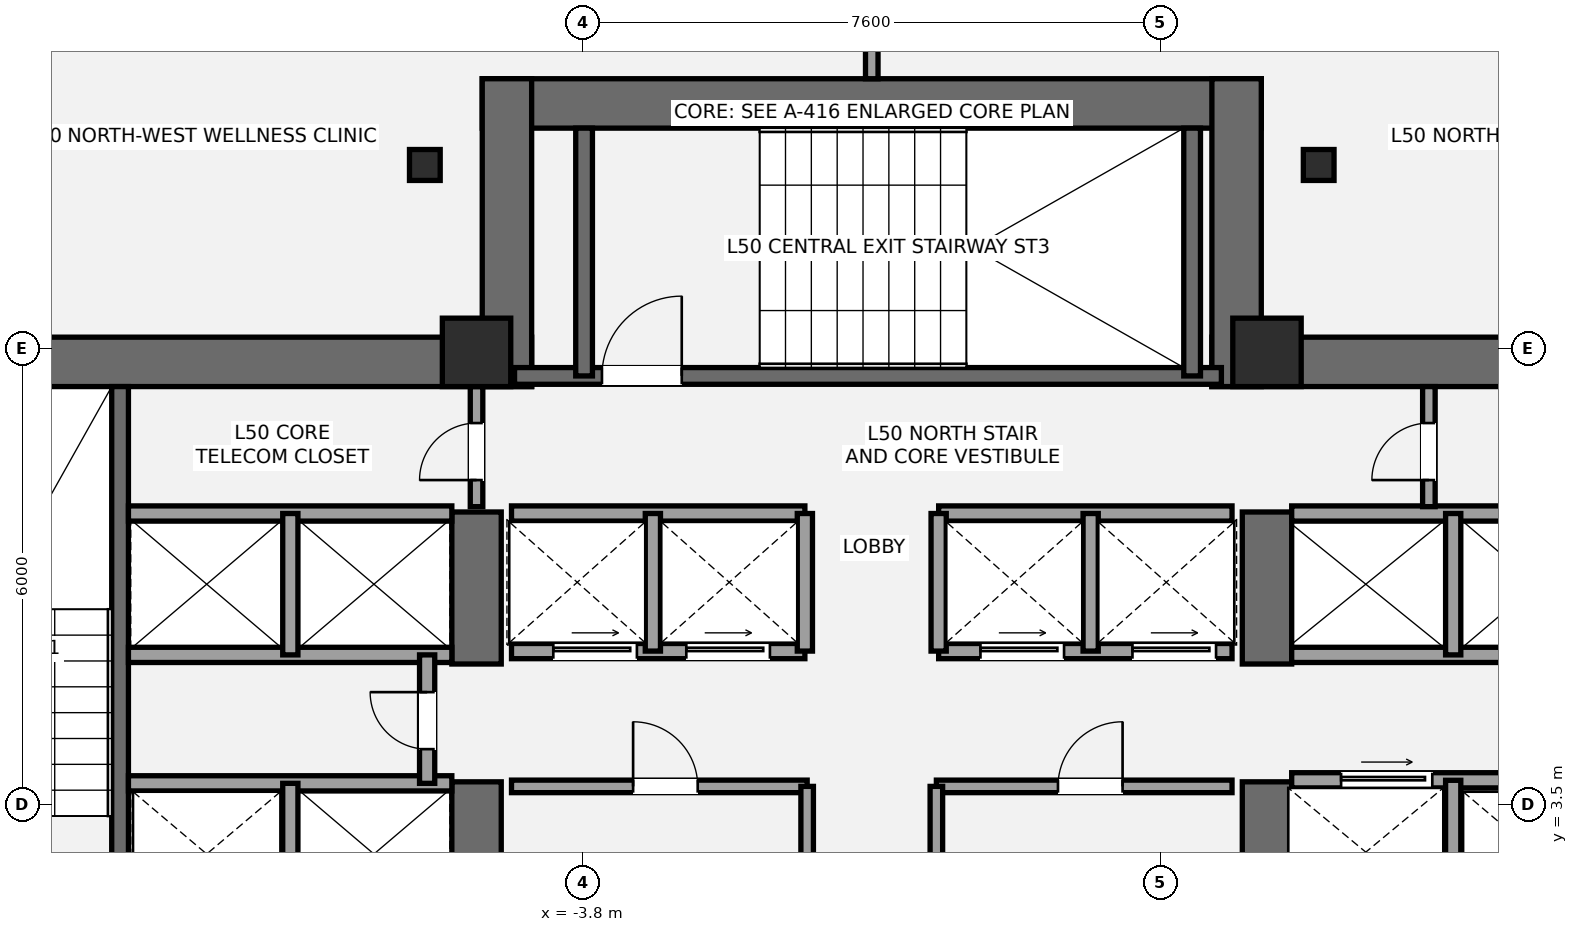
"""IFC4 building model, lengths in metres.
Left out: names, types, materials, properties, quantities, classifications, styles, units other than length and angle.
Written with IfcOpenShell. Run it as: python <this file> out.ifc"""

import sys

from ifc_helpers import new_model, si_unit, direction, frame, frame_2d, origin, origin_2d, place, context, subcontext, project, spatial, rectangle, i_section, extrude, element, fill, save


model = new_model("IFC4")
c1 = context("Model", 3, precision=1e-05, world=origin(), true_north=direction((0.0, 1.0)))
c2 = subcontext(c1, "Body", "Model", "MODEL_VIEW")
j1 = project(units=[si_unit("LENGTHUNIT", "METRE"), si_unit("PLANEANGLEUNIT", "RADIAN")], contexts=[c1])
p1 = place(None, origin())
s1 = spatial("IfcSite", under=j1, at=p1, CompositionType="ELEMENT")
p2 = place(p1, origin())
s2 = spatial("IfcBuilding", under=s1, at=p2, CompositionType="ELEMENT")
p3 = place(p2, frame((0.0, 0.0, 182.2)))
s3 = spatial("IfcBuildingStorey", under=s2, at=p3, CompositionType="ELEMENT", Elevation=182.2)
p4 = place(p3, frame((-13.8, 9.325, 0.0), z_axis=(0.0, 0.0, 1.0), x_axis=(1.0, 0.0, 0.0)))
e1 = element("IfcWall", 1, at=p4, inside=s3, PredefinedType="SHEAR", context=c2, shape_type="SweptSolid", body=[
    extrude(rectangle(XDim=9.325, YDim=0.65, at=frame_2d((4.663, 0.0))), origin(), (0.0, 0.0, 1.0), 3.2),
])
p5 = place(p3, frame((-5.2, 1.2, 0.0), z_axis=(0.0, 0.0, 1.0), x_axis=(0.0, 1.0, 0.0)))
e2 = element("IfcWall", 2, at=p5, inside=s3, PredefinedType="SHEAR", context=c2, shape_type="SweptSolid", body=[
    extrude(rectangle(XDim=2.6, YDim=0.65, at=frame_2d((1.3, 0.0))), origin(), (0.0, 0.0, 1.0), 3.2),
])
p6 = place(p3, frame((-5.2, 5.35, 0.0), z_axis=(0.0, 0.0, 1.0), x_axis=(0.0, 1.0, 0.0)))
e3 = element("IfcWall", 3, at=p6, inside=s3, PredefinedType="SHEAR", context=c2, shape_type="SweptSolid", body=[
    extrude(rectangle(XDim=2.0, YDim=0.65, at=frame_2d((1.0, 0.0))), origin(), (0.0, 0.0, 1.0), 3.2),
])
p7 = place(p3, frame((-9.89, 1.85, 0.0), z_axis=(0.0, 0.0, 1.0), x_axis=(0.0, 1.0, 0.0)))
e4 = element("IfcWall", 4, at=p7, inside=s3, PredefinedType="SHEAR", context=c2, shape_type="SweptSolid", body=[
    extrude(rectangle(XDim=7.15, YDim=0.22, at=frame_2d((3.575, 0.0))), origin(), (0.0, 0.0, 1.0), 3.2),
])
p8 = place(p3, frame((4.475, 9.325, 0.0), z_axis=(0.0, 0.0, 1.0), x_axis=(1.0, 0.0, 0.0)))
e5 = element("IfcWall", 5, at=p8, inside=s3, PredefinedType="SHEAR", context=c2, shape_type="SweptSolid", body=[
    extrude(rectangle(XDim=9.325, YDim=0.65, at=frame_2d((4.663, 0.0))), origin(), (0.0, 0.0, 1.0), 3.2),
])
p9 = place(p3, frame((5.2, 1.2, 0.0), z_axis=(0.0, 0.0, 1.0), x_axis=(0.0, 1.0, 0.0)))
e6 = element("IfcWall", 6, at=p9, inside=s3, PredefinedType="SHEAR", context=c2, shape_type="SweptSolid", body=[
    extrude(rectangle(XDim=2.6, YDim=0.65, at=frame_2d((1.3, 0.0))), origin(), (0.0, 0.0, 1.0), 3.2),
])
p10 = place(p3, frame((5.2, 5.35, 0.0), z_axis=(0.0, 0.0, 1.0), x_axis=(0.0, 1.0, 0.0)))
e7 = element("IfcWall", 7, at=p10, inside=s3, PredefinedType="SHEAR", context=c2, shape_type="SweptSolid", body=[
    extrude(rectangle(XDim=2.0, YDim=0.65, at=frame_2d((1.0, 0.0))), origin(), (0.0, 0.0, 1.0), 3.2),
])
p11 = place(p3, frame((-5.125, 12.725, 0.0), z_axis=(0.0, 0.0, 1.0), x_axis=(1.0, 0.0, 0.0)))
e8 = element("IfcWall", 8, at=p11, inside=s3, PredefinedType="SHEAR", context=c2, shape_type="SweptSolid", body=[
    extrude(rectangle(XDim=10.25, YDim=0.65, at=frame_2d((5.125, 0.0))), origin(), (0.0, 0.0, 1.0), 3.2),
])
for number, where, z_axis, x_axis in (
    (9, (-4.8, 9.0, 0.0), (0.0, 0.0, 1.0), (0.0, 1.0, 0.0)),
    (10, (4.8, 9.0, 0.0), (0.0, 0.0, 1.0), (0.0, 1.0, 0.0)),
):
    element("IfcWall", number, at=place(p3, frame(where, z_axis=z_axis, x_axis=x_axis)), inside=s3, PredefinedType="SHEAR", context=c2, shape_type="SweptSolid", body=[
        extrude(rectangle(XDim=4.05, YDim=0.65, at=frame_2d((2.025, 0.0))), origin(), (0.0, 0.0, 1.0), 3.2),
    ])
p12 = place(p3, frame((-4.7, 9.14, 0.0), z_axis=(0.0, 0.0, 1.0), x_axis=(1.0, 0.0, 0.0)))
e11 = element("IfcWall", 11, at=p12, inside=s3, PredefinedType="SHEAR", context=c2, shape_type="SweptSolid", body=[
    extrude(rectangle(XDim=9.3, YDim=0.22, at=frame_2d((4.65, 0.0))), origin(), (0.0, 0.0, 1.0), 3.2),
])
p13 = place(p12, frame((1.15, 0.0, 0.0)))
e12 = element("IfcOpeningElement", 12, at=p13, cuts=e11, PredefinedType="OPENING", context=c2, shape_type="SweptSolid", body=[
    extrude(rectangle(XDim=1.05, YDim=2.15, at=frame_2d((0.525, 1.075))), frame((0.0, 0.12, 0.0), z_axis=(0.0, -1.0, 0.0), x_axis=(1.0, 0.0, 0.0)), (0.0, 0.0, 1.0), 0.24),
])
for number, where, z_axis, x_axis in (
    (13, (-3.785, 9.14, 0.0), (0.0, 0.0, 1.0), (0.0, 1.0, 0.0)),
    (14, (4.215, 9.14, 0.0), (0.0, 0.0, 1.0), (0.0, 1.0, 0.0)),
):
    element("IfcWall", number, at=place(p3, frame(where, z_axis=z_axis, x_axis=x_axis)), inside=s3, PredefinedType="SHEAR", context=c2, shape_type="SweptSolid", body=[
        extrude(rectangle(XDim=3.26, YDim=0.22, at=frame_2d((1.63, 0.0))), origin(), (0.0, 0.0, 1.0), 3.2),
    ])
for number, where, z_axis, x_axis in (
    (15, (-5.2, 9.45, 0.0), (0.0, 0.0, 1.0), (1.0, 0.0, 0.0)),
    (16, (5.2, 9.45, 0.0), (0.0, 0.0, 1.0), (1.0, 0.0, 0.0)),
):
    element("IfcColumn", number, at=place(p3, frame(where, z_axis=z_axis, x_axis=x_axis)), inside=s3, PredefinedType="COLUMN", context=c2, shape_type="SweptSolid", body=[
        extrude(rectangle(XDim=0.9, YDim=0.9, at=origin_2d()), origin(), (0.0, 0.0, 1.0), 3.2),
    ])
for number, where, z_axis, x_axis in (
    (17, (5.88, 11.915, 0.0), (0.0, 0.0, 1.0), (1.0, 0.0, 0.0)),
    (18, (-5.88, 11.915, 0.0), (0.0, 0.0, 1.0), (1.0, 0.0, 0.0)),
):
    element("IfcColumn", number, at=place(p3, frame(where, z_axis=z_axis, x_axis=x_axis)), inside=s3, PredefinedType="COLUMN", context=c2, shape_type="SweptSolid", body=[
        extrude(i_section(OverallWidth=0.404, OverallDepth=0.407, WebThickness=0.027, FlangeThickness=0.044, at=origin_2d()), origin(), (0.0, 0.0, 1.0), 3.2),
    ])
p14 = place(p3, frame((-9.78, 3.78, 0.0), z_axis=(0.0, 0.0, 1.0), x_axis=(1.0, 0.0, 0.0)))
e19 = element("IfcWall", 19, at=p14, inside=s3, PredefinedType="SOLIDWALL", context=c2, shape_type="SweptSolid", body=[
    extrude(rectangle(XDim=4.255, YDim=0.2, at=frame_2d((2.127, 0.0))), origin(), (0.0, 0.0, 1.0), 3.02),
])
p15 = place(p3, frame((-7.65, 1.85, 0.0), z_axis=(0.0, 0.0, 1.0), x_axis=(0.0, 1.0, 0.0)))
e20 = element("IfcWall", 20, at=p15, inside=s3, PredefinedType="SOLIDWALL", context=c2, shape_type="SweptSolid", body=[
    extrude(rectangle(XDim=1.93, YDim=0.2, at=frame_2d((0.965, 0.0))), origin(), (0.0, 0.0, 1.0), 3.02),
])
for number, where, z_axis, x_axis in (
    (21, (-9.78, 5.47, 0.0), (0.0, 0.0, 1.0), (1.0, 0.0, 0.0)),
    (22, (-9.78, 7.33, 0.0), (0.0, 0.0, 1.0), (1.0, 0.0, 0.0)),
):
    element("IfcWall", number, at=place(p3, frame(where, z_axis=z_axis, x_axis=x_axis)), inside=s3, PredefinedType="SOLIDWALL", context=c2, shape_type="SweptSolid", body=[
        extrude(rectangle(XDim=4.255, YDim=0.2, at=frame_2d((2.127, 0.0))), origin(), (0.0, 0.0, 1.0), 3.02),
    ])
p16 = place(p3, frame((-7.65, 5.47, 0.0), z_axis=(0.0, 0.0, 1.0), x_axis=(0.0, 1.0, 0.0)))
e23 = element("IfcWall", 23, at=p16, inside=s3, PredefinedType="SOLIDWALL", context=c2, shape_type="SweptSolid", body=[
    extrude(rectangle(XDim=1.86, YDim=0.2, at=frame_2d((0.93, 0.0))), origin(), (0.0, 0.0, 1.0), 3.02),
])
p17 = place(p3, frame((-5.85, 3.78, 0.0), z_axis=(0.0, 0.0, 1.0), x_axis=(0.0, 1.0, 0.0)))
e24 = element("IfcWall", 24, at=p17, inside=s3, PredefinedType="SOLIDWALL", context=c2, shape_type="SweptSolid", body=[
    extrude(rectangle(XDim=1.69, YDim=0.2, at=frame_2d((0.845, 0.0))), origin(), (0.0, 0.0, 1.0), 3.02),
])
p18 = place(p17, frame((0.45, 0.0, 0.0)))
e25 = element("IfcOpeningElement", 25, at=p18, cuts=e24, PredefinedType="OPENING", context=c2, shape_type="SweptSolid", body=[
    extrude(rectangle(XDim=0.75, YDim=2.1, at=frame_2d((0.375, 1.05))), frame((0.0, 0.11, 0.0), z_axis=(0.0, -1.0, 0.0), x_axis=(1.0, 0.0, 0.0)), (0.0, 0.0, 1.0), 0.22),
])
p19 = place(p3, frame((5.525, 3.82, 0.0), z_axis=(0.0, 0.0, 1.0), x_axis=(1.0, 0.0, 0.0)))
e26 = element("IfcWall", 26, at=p19, inside=s3, PredefinedType="SOLIDWALL", context=c2, shape_type="SweptSolid", body=[
    extrude(rectangle(XDim=4.255, YDim=0.2, at=frame_2d((2.127, 0.0))), origin(), (0.0, 0.0, 1.0), 3.02),
])
p20 = place(p19, frame((0.65, 0.0, 0.0)))
e27 = element("IfcOpeningElement", 27, at=p20, cuts=e26, PredefinedType="OPENING", context=c2, shape_type="SweptSolid", body=[
    extrude(rectangle(XDim=1.2, YDim=2.2, at=frame_2d((0.6, 1.1))), frame((0.0, 0.11, 0.0), z_axis=(0.0, -1.0, 0.0), x_axis=(1.0, 0.0, 0.0)), (0.0, 0.0, 1.0), 0.22),
])
p21 = place(p3, frame((7.65, 1.85, 0.0), z_axis=(0.0, 0.0, 1.0), x_axis=(0.0, 1.0, 0.0)))
e28 = element("IfcWall", 28, at=p21, inside=s3, PredefinedType="SOLIDWALL", context=c2, shape_type="SweptSolid", body=[
    extrude(rectangle(XDim=1.97, YDim=0.2, at=frame_2d((0.985, 0.0))), origin(), (0.0, 0.0, 1.0), 3.02),
])
for number, where, z_axis, x_axis in (
    (29, (5.525, 5.47, 0.0), (0.0, 0.0, 1.0), (1.0, 0.0, 0.0)),
    (30, (5.525, 7.33, 0.0), (0.0, 0.0, 1.0), (1.0, 0.0, 0.0)),
):
    element("IfcWall", number, at=place(p3, frame(where, z_axis=z_axis, x_axis=x_axis)), inside=s3, PredefinedType="SOLIDWALL", context=c2, shape_type="SweptSolid", body=[
        extrude(rectangle(XDim=4.255, YDim=0.2, at=frame_2d((2.127, 0.0))), origin(), (0.0, 0.0, 1.0), 3.02),
    ])
p22 = place(p3, frame((7.65, 5.47, 0.0), z_axis=(0.0, 0.0, 1.0), x_axis=(0.0, 1.0, 0.0)))
e31 = element("IfcWall", 31, at=p22, inside=s3, PredefinedType="SOLIDWALL", context=c2, shape_type="SweptSolid", body=[
    extrude(rectangle(XDim=1.86, YDim=0.2, at=frame_2d((0.93, 0.0))), origin(), (0.0, 0.0, 1.0), 3.02),
])
p23 = place(p3, frame((-4.74, 3.74, 0.0), z_axis=(0.0, 0.0, 1.0), x_axis=(1.0, 0.0, 0.0)))
e32 = element("IfcWall", 32, at=p23, inside=s3, PredefinedType="PARTITIONING", context=c2, shape_type="SweptSolid", body=[
    extrude(rectangle(XDim=3.89, YDim=0.165, at=frame_2d((1.945, 0.0))), origin(), (0.0, 0.0, 1.0), 3.02),
])
p24 = place(p23, frame((1.6, 0.0, 0.0)))
e33 = element("IfcOpeningElement", 33, at=p24, cuts=e32, PredefinedType="OPENING", context=c2, shape_type="SweptSolid", body=[
    extrude(rectangle(XDim=0.85, YDim=2.1, at=frame_2d((0.425, 1.05))), frame((0.0, 0.093, 0.0), z_axis=(0.0, -1.0, 0.0), x_axis=(1.0, 0.0, 0.0)), (0.0, 0.0, 1.0), 0.185),
])
p25 = place(p3, frame((-0.85, 1.92, 0.0), z_axis=(0.0, 0.0, 1.0), x_axis=(0.0, 1.0, 0.0)))
e34 = element("IfcWall", 34, at=p25, inside=s3, PredefinedType="PARTITIONING", context=c2, shape_type="SweptSolid", body=[
    extrude(rectangle(XDim=1.82, YDim=0.165, at=frame_2d((0.91, 0.0))), origin(), (0.0, 0.0, 1.0), 3.02),
])
p26 = place(p3, frame((0.85, 3.74, 0.0), z_axis=(0.0, 0.0, 1.0), x_axis=(1.0, 0.0, 0.0)))
e35 = element("IfcWall", 35, at=p26, inside=s3, PredefinedType="PARTITIONING", context=c2, shape_type="SweptSolid", body=[
    extrude(rectangle(XDim=3.89, YDim=0.165, at=frame_2d((1.945, 0.0))), origin(), (0.0, 0.0, 1.0), 3.02),
])
p27 = place(p26, frame((1.6, 0.0, 0.0)))
e36 = element("IfcOpeningElement", 36, at=p27, cuts=e35, PredefinedType="OPENING", context=c2, shape_type="SweptSolid", body=[
    extrude(rectangle(XDim=0.85, YDim=2.1, at=frame_2d((0.425, 1.05))), frame((0.0, 0.093, 0.0), z_axis=(0.0, -1.0, 0.0), x_axis=(1.0, 0.0, 0.0)), (0.0, 0.0, 1.0), 0.185),
])
p28 = place(p3, frame((0.85, 1.92, 0.0), z_axis=(0.0, 0.0, 1.0), x_axis=(0.0, 1.0, 0.0)))
e37 = element("IfcWall", 37, at=p28, inside=s3, PredefinedType="PARTITIONING", context=c2, shape_type="SweptSolid", body=[
    extrude(rectangle(XDim=1.82, YDim=0.165, at=frame_2d((0.91, 0.0))), origin(), (0.0, 0.0, 1.0), 3.02),
])
p29 = place(p3, frame((-4.74, 5.52, 0.0), z_axis=(0.0, 0.0, 1.0), x_axis=(1.0, 0.0, 0.0)))
e38 = element("IfcWall", 38, at=p29, inside=s3, PredefinedType="SOLIDWALL", context=c2, shape_type="SweptSolid", body=[
    extrude(rectangle(XDim=3.86, YDim=0.2, at=frame_2d((1.93, 0.0))), origin(), (0.0, 0.0, 1.0), 3.02),
])
p30 = place(p29, frame((0.55, 0.0, 0.0)))
e39 = element("IfcOpeningElement", 39, at=p30, cuts=e38, PredefinedType="OPENING", context=c2, shape_type="SweptSolid", body=[
    extrude(rectangle(XDim=1.1, YDim=2.2, at=frame_2d((0.55, 1.1))), frame((0.0, 0.11, 0.0), z_axis=(0.0, -1.0, 0.0), x_axis=(1.0, 0.0, 0.0)), (0.0, 0.0, 1.0), 0.22),
])
p31 = place(p29, frame((2.3, 0.0, 0.0)))
e40 = element("IfcOpeningElement", 40, at=p31, cuts=e38, PredefinedType="OPENING", context=c2, shape_type="SweptSolid", body=[
    extrude(rectangle(XDim=1.1, YDim=2.2, at=frame_2d((0.55, 1.1))), frame((0.0, 0.11, 0.0), z_axis=(0.0, -1.0, 0.0), x_axis=(1.0, 0.0, 0.0)), (0.0, 0.0, 1.0), 0.22),
])
p32 = place(p3, frame((0.88, 5.52, 0.0), z_axis=(0.0, 0.0, 1.0), x_axis=(1.0, 0.0, 0.0)))
e41 = element("IfcWall", 41, at=p32, inside=s3, PredefinedType="SOLIDWALL", context=c2, shape_type="SweptSolid", body=[
    extrude(rectangle(XDim=3.86, YDim=0.2, at=frame_2d((1.93, 0.0))), origin(), (0.0, 0.0, 1.0), 3.02),
])
p33 = place(p32, frame((0.55, 0.0, 0.0)))
e42 = element("IfcOpeningElement", 42, at=p33, cuts=e41, PredefinedType="OPENING", context=c2, shape_type="SweptSolid", body=[
    extrude(rectangle(XDim=1.1, YDim=2.2, at=frame_2d((0.55, 1.1))), frame((0.0, 0.11, 0.0), z_axis=(0.0, -1.0, 0.0), x_axis=(1.0, 0.0, 0.0)), (0.0, 0.0, 1.0), 0.22),
])
p34 = place(p32, frame((2.55, 0.0, 0.0)))
e43 = element("IfcOpeningElement", 43, at=p34, cuts=e41, PredefinedType="OPENING", context=c2, shape_type="SweptSolid", body=[
    extrude(rectangle(XDim=1.1, YDim=2.2, at=frame_2d((0.55, 1.1))), frame((0.0, 0.11, 0.0), z_axis=(0.0, -1.0, 0.0), x_axis=(1.0, 0.0, 0.0)), (0.0, 0.0, 1.0), 0.22),
])
for number, where, z_axis, x_axis in (
    (44, (-4.74, 7.33, 0.0), (0.0, 0.0, 1.0), (1.0, 0.0, 0.0)),
    (45, (0.88, 7.33, 0.0), (0.0, 0.0, 1.0), (1.0, 0.0, 0.0)),
):
    element("IfcWall", number, at=place(p3, frame(where, z_axis=z_axis, x_axis=x_axis)), inside=s3, PredefinedType="SOLIDWALL", context=c2, shape_type="SweptSolid", body=[
        extrude(rectangle(XDim=3.86, YDim=0.2, at=frame_2d((1.93, 0.0))), origin(), (0.0, 0.0, 1.0), 3.02),
    ])
for number, where, z_axis, x_axis in (
    (46, (-2.88, 5.52, 0.0), (0.0, 0.0, 1.0), (0.0, 1.0, 0.0)),
    (47, (2.88, 5.52, 0.0), (0.0, 0.0, 1.0), (0.0, 1.0, 0.0)),
    (48, (-0.88, 5.52, 0.0), (0.0, 0.0, 1.0), (0.0, 1.0, 0.0)),
    (49, (0.88, 5.52, 0.0), (0.0, 0.0, 1.0), (0.0, 1.0, 0.0)),
):
    element("IfcWall", number, at=place(p3, frame(where, z_axis=z_axis, x_axis=x_axis)), inside=s3, PredefinedType="SOLIDWALL", context=c2, shape_type="SweptSolid", body=[
        extrude(rectangle(XDim=1.81, YDim=0.2, at=frame_2d((0.905, 0.0))), origin(), (0.0, 0.0, 1.0), 3.02),
    ])
p35 = place(p3, frame((-5.2, 7.42, 0.0), z_axis=(0.0, 0.0, 1.0), x_axis=(0.0, 1.0, 0.0)))
e50 = element("IfcWall", 50, at=p35, inside=s3, PredefinedType="PARTITIONING", context=c2, shape_type="SweptSolid", body=[
    extrude(rectangle(XDim=1.58, YDim=0.165, at=frame_2d((0.79, 0.0))), origin(), (0.0, 0.0, 1.0), 3.02),
])
p36 = place(p35, frame((0.35, 0.0, 0.0)))
e51 = element("IfcOpeningElement", 51, at=p36, cuts=e50, PredefinedType="OPENING", context=c2, shape_type="SweptSolid", body=[
    extrude(rectangle(XDim=0.75, YDim=2.1, at=frame_2d((0.375, 1.05))), frame((0.0, 0.093, 0.0), z_axis=(0.0, -1.0, 0.0), x_axis=(1.0, 0.0, 0.0)), (0.0, 0.0, 1.0), 0.185),
])
p37 = place(p3, frame((7.33, 7.42, 0.0), z_axis=(0.0, 0.0, 1.0), x_axis=(0.0, 1.0, 0.0)))
e52 = element("IfcWall", 52, at=p37, inside=s3, PredefinedType="PARTITIONING", context=c2, shape_type="SweptSolid", body=[
    extrude(rectangle(XDim=1.58, YDim=0.165, at=frame_2d((0.79, 0.0))), origin(), (0.0, 0.0, 1.0), 3.02),
])
p38 = place(p37, frame((0.35, 0.0, 0.0)))
e53 = element("IfcOpeningElement", 53, at=p38, cuts=e52, PredefinedType="OPENING", context=c2, shape_type="SweptSolid", body=[
    extrude(rectangle(XDim=0.75, YDim=2.1, at=frame_2d((0.375, 1.05))), frame((0.0, 0.093, 0.0), z_axis=(0.0, -1.0, 0.0), x_axis=(1.0, 0.0, 0.0)), (0.0, 0.0, 1.0), 0.185),
])
p39 = place(p3, frame((0.0, 13.05, 0.0), z_axis=(0.0, 0.0, 1.0), x_axis=(0.0, 1.0, 0.0)))
e54 = element("IfcWall", 54, at=p39, inside=s3, PredefinedType="PARTITIONING", context=c2, shape_type="SweptSolid", body=[
    extrude(rectangle(XDim=3.383, YDim=0.165, at=frame_2d((1.691, 0.0))), origin(), (0.0, 0.0, 1.0), 3.02),
])
p40 = place(p13, origin())
e55 = element("IfcDoor", 55, at=p40, inside=s3, OperationType="SINGLE_SWING_RIGHT", PredefinedType="DOOR", context=c2, shape_type="SweptSolid", body=[
    extrude(rectangle(XDim=1.05, YDim=2.15, at=frame_2d((0.525, 1.075))), frame((0.0, 0.025, 0.0), z_axis=(0.0, -1.0, 0.0), x_axis=(1.0, 0.0, 0.0)), (0.0, 0.0, 1.0), 0.05),
])
fill(e12, e55)
p41 = place(p18, origin())
e56 = element("IfcDoor", 56, at=p41, inside=s3, OperationType="SINGLE_SWING_RIGHT", PredefinedType="DOOR", context=c2, shape_type="SweptSolid", body=[
    extrude(rectangle(XDim=0.75, YDim=2.1, at=frame_2d((0.375, 1.05))), frame((0.0, 0.025, 0.0), z_axis=(0.0, -1.0, 0.0), x_axis=(1.0, 0.0, 0.0)), (0.0, 0.0, 1.0), 0.05),
])
fill(e25, e56)
p42 = place(p20, origin())
e57 = element("IfcDoor", 57, at=p42, inside=s3, OperationType="SLIDING_TO_RIGHT", PredefinedType="DOOR", context=c2, shape_type="SweptSolid", body=[
    extrude(rectangle(XDim=1.2, YDim=2.2, at=frame_2d((0.6, 1.1))), frame((0.0, 0.025, 0.0), z_axis=(0.0, -1.0, 0.0), x_axis=(1.0, 0.0, 0.0)), (0.0, 0.0, 1.0), 0.05),
])
fill(e27, e57)
p43 = place(p24, origin())
e58 = element("IfcDoor", 58, at=p43, inside=s3, OperationType="SINGLE_SWING_LEFT", PredefinedType="DOOR", context=c2, shape_type="SweptSolid", body=[
    extrude(rectangle(XDim=0.85, YDim=2.1, at=frame_2d((0.425, 1.05))), frame((0.0, 0.025, 0.0), z_axis=(0.0, -1.0, 0.0), x_axis=(1.0, 0.0, 0.0)), (0.0, 0.0, 1.0), 0.05),
])
fill(e33, e58)
p44 = place(p27, origin())
e59 = element("IfcDoor", 59, at=p44, inside=s3, OperationType="SINGLE_SWING_RIGHT", PredefinedType="DOOR", context=c2, shape_type="SweptSolid", body=[
    extrude(rectangle(XDim=0.85, YDim=2.1, at=frame_2d((0.425, 1.05))), frame((0.0, 0.025, 0.0), z_axis=(0.0, -1.0, 0.0), x_axis=(1.0, 0.0, 0.0)), (0.0, 0.0, 1.0), 0.05),
])
fill(e36, e59)
p45 = place(p30, origin())
e60 = element("IfcDoor", 60, at=p45, inside=s3, OperationType="SLIDING_TO_LEFT", PredefinedType="DOOR", context=c2, shape_type="SweptSolid", body=[
    extrude(rectangle(XDim=1.1, YDim=2.2, at=frame_2d((0.55, 1.1))), frame((0.0, 0.025, 0.0), z_axis=(0.0, -1.0, 0.0), x_axis=(1.0, 0.0, 0.0)), (0.0, 0.0, 1.0), 0.05),
])
fill(e39, e60)
p46 = place(p31, origin())
e61 = element("IfcDoor", 61, at=p46, inside=s3, OperationType="SLIDING_TO_LEFT", PredefinedType="DOOR", context=c2, shape_type="SweptSolid", body=[
    extrude(rectangle(XDim=1.1, YDim=2.2, at=frame_2d((0.55, 1.1))), frame((0.0, 0.025, 0.0), z_axis=(0.0, -1.0, 0.0), x_axis=(1.0, 0.0, 0.0)), (0.0, 0.0, 1.0), 0.05),
])
fill(e40, e61)
p47 = place(p33, origin())
e62 = element("IfcDoor", 62, at=p47, inside=s3, OperationType="SLIDING_TO_LEFT", PredefinedType="DOOR", context=c2, shape_type="SweptSolid", body=[
    extrude(rectangle(XDim=1.1, YDim=2.2, at=frame_2d((0.55, 1.1))), frame((0.0, 0.025, 0.0), z_axis=(0.0, -1.0, 0.0), x_axis=(1.0, 0.0, 0.0)), (0.0, 0.0, 1.0), 0.05),
])
fill(e42, e62)
p48 = place(p34, origin())
e63 = element("IfcDoor", 63, at=p48, inside=s3, OperationType="SLIDING_TO_LEFT", PredefinedType="DOOR", context=c2, shape_type="SweptSolid", body=[
    extrude(rectangle(XDim=1.1, YDim=2.2, at=frame_2d((0.55, 1.1))), frame((0.0, 0.025, 0.0), z_axis=(0.0, -1.0, 0.0), x_axis=(1.0, 0.0, 0.0)), (0.0, 0.0, 1.0), 0.05),
])
fill(e43, e63)
p49 = place(p36, origin())
e64 = element("IfcDoor", 64, at=p49, inside=s3, OperationType="SINGLE_SWING_LEFT", PredefinedType="DOOR", context=c2, shape_type="SweptSolid", body=[
    extrude(rectangle(XDim=0.75, YDim=2.1, at=frame_2d((0.375, 1.05))), frame((0.0, 0.025, 0.0), z_axis=(0.0, -1.0, 0.0), x_axis=(1.0, 0.0, 0.0)), (0.0, 0.0, 1.0), 0.05),
])
fill(e51, e64)
p50 = place(p38, origin())
e65 = element("IfcDoor", 65, at=p50, inside=s3, OperationType="SINGLE_SWING_LEFT", PredefinedType="DOOR", context=c2, shape_type="SweptSolid", body=[
    extrude(rectangle(XDim=0.75, YDim=2.1, at=frame_2d((0.375, 1.05))), frame((0.0, 0.025, 0.0), z_axis=(0.0, -1.0, 0.0), x_axis=(1.0, 0.0, 0.0)), (0.0, 0.0, 1.0), 0.05),
])
fill(e53, e65)
save(model, sys.argv[1])
